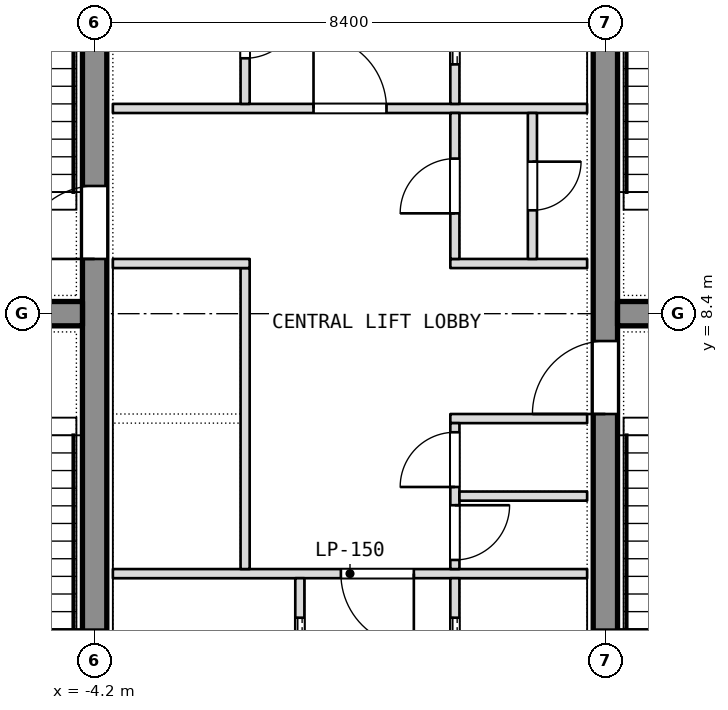
"""IFC4 building model, lengths in metres.
Left out: names, types, materials, properties, quantities, classifications, styles, units other than length and angle.
Written with IfcOpenShell. Run it as: python <this file> out.ifc"""

import sys

from ifc_helpers import new_model, si_unit, direction, frame, frame_2d, origin, place, context, subcontext, project, spatial, rectangle, extrude, element, fill, save


model = new_model("IFC4")
c1 = context("Model", 3, precision=1e-05, world=origin(), true_north=direction((0.0, 1.0)))
c2 = subcontext(c1, "Body", "Model", "MODEL_VIEW")
j1 = project(units=[si_unit("LENGTHUNIT", "METRE"), si_unit("PLANEANGLEUNIT", "RADIAN")], contexts=[c1])
p1 = place(None, origin())
s1 = spatial("IfcSite", under=j1, at=p1, CompositionType="ELEMENT")
p2 = place(p1, origin())
s2 = spatial("IfcBuilding", under=s1, at=p2, CompositionType="ELEMENT")
p3 = place(p2, frame((0.0, 0.0, 245.3)))
s3 = spatial("IfcBuildingStorey", under=s2, at=p3, CompositionType="ELEMENT", Elevation=245.3)
p4 = place(p3, frame((-4.2, 0.8, 0.0), z_axis=(0.0, 0.0, 1.0), x_axis=(0.0, 1.0, 0.0)))
e1 = element("IfcWall", 1, at=p4, inside=s3, PredefinedType="SHEAR", context=c2, shape_type="SweptSolid", body=[
    extrude(rectangle(XDim=15.2, YDim=0.4, at=frame_2d((7.6, 0.0))), origin(), (0.0, 0.0, 1.0), 3.6),
])
p5 = place(p4, frame((8.5, 0.0, 0.0)))
e2 = element("IfcOpeningElement", 2, at=p5, cuts=e1, PredefinedType="OPENING", context=c2, shape_type="SweptSolid", body=[
    extrude(rectangle(XDim=1.2, YDim=2.1, at=frame_2d((0.6, 1.05))), frame((0.0, 0.2, 0.0), z_axis=(0.0, -1.0, 0.0), x_axis=(1.0, 0.0, 0.0)), (0.0, 0.0, 1.0), 0.4),
])
p6 = place(p3, frame((4.2, 0.8, 0.0), z_axis=(0.0, 0.0, 1.0), x_axis=(0.0, 1.0, 0.0)))
e3 = element("IfcWall", 3, at=p6, inside=s3, PredefinedType="SHEAR", context=c2, shape_type="SweptSolid", body=[
    extrude(rectangle(XDim=15.2, YDim=0.4, at=frame_2d((7.6, 0.0))), origin(), (0.0, 0.0, 1.0), 3.6),
])
p7 = place(p6, frame((5.95, 0.0, 0.0)))
e4 = element("IfcOpeningElement", 4, at=p7, cuts=e3, PredefinedType="OPENING", context=c2, shape_type="SweptSolid", body=[
    extrude(rectangle(XDim=1.2, YDim=2.1, at=frame_2d((0.6, 1.05))), frame((0.0, 0.2, 0.0), z_axis=(0.0, -1.0, 0.0), x_axis=(1.0, 0.0, 0.0)), (0.0, 0.0, 1.0), 0.4),
])
for number, where, z_axis, x_axis in (
    (5, (-11.1, 8.4, 0.0), (0.0, 0.0, 1.0), (1.0, 0.0, 0.0)),
    (6, (4.4, 8.4, 0.0), (0.0, 0.0, 1.0), (1.0, 0.0, 0.0)),
):
    element("IfcWall", number, at=place(p3, frame(where, z_axis=z_axis, x_axis=x_axis)), inside=s3, PredefinedType="SHEAR", context=c2, shape_type="SweptSolid", body=[
        extrude(rectangle(XDim=6.7, YDim=0.4, at=frame_2d((3.35, 0.0))), origin(), (0.0, 0.0, 1.0), 3.6),
    ])
p8 = place(p3, frame((-3.9, 4.125, 0.0), z_axis=(0.0, 0.0, 1.0), x_axis=(1.0, 0.0, 0.0)))
e7 = element("IfcWall", 7, at=p8, inside=s3, PredefinedType="PARTITIONING", context=c2, shape_type="SweptSolid", body=[
    extrude(rectangle(XDim=7.8, YDim=0.15, at=frame_2d((3.9, 0.0))), origin(), (0.0, 0.0, 1.0), 3.34),
])
p9 = place(p8, frame((3.75, 0.0, 0.0)))
e8 = element("IfcOpeningElement", 8, at=p9, cuts=e7, PredefinedType="OPENING", context=c2, shape_type="SweptSolid", body=[
    extrude(rectangle(XDim=1.2, YDim=2.1, at=frame_2d((0.6, 1.05))), frame((0.0, 0.075, 0.0), z_axis=(0.0, -1.0, 0.0), x_axis=(1.0, 0.0, 0.0)), (0.0, 0.0, 1.0), 0.15),
])
p10 = place(p3, frame((-3.9, 11.775, 0.0), z_axis=(0.0, 0.0, 1.0), x_axis=(1.0, 0.0, 0.0)))
e9 = element("IfcWall", 9, at=p10, inside=s3, PredefinedType="PARTITIONING", context=c2, shape_type="SweptSolid", body=[
    extrude(rectangle(XDim=7.8, YDim=0.15, at=frame_2d((3.9, 0.0))), origin(), (0.0, 0.0, 1.0), 3.34),
])
p11 = place(p10, frame((3.3, 0.0, 0.0)))
e10 = element("IfcOpeningElement", 10, at=p11, cuts=e9, PredefinedType="OPENING", context=c2, shape_type="SweptSolid", body=[
    extrude(rectangle(XDim=1.2, YDim=2.1, at=frame_2d((0.6, 1.05))), frame((0.0, 0.075, 0.0), z_axis=(0.0, -1.0, 0.0), x_axis=(1.0, 0.0, 0.0)), (0.0, 0.0, 1.0), 0.15),
])
p12 = place(p3, frame((-0.825, 1.5, 0.0), z_axis=(0.0, 0.0, 1.0), x_axis=(0.0, 1.0, 0.0)))
e11 = element("IfcWall", 11, at=p12, inside=s3, PredefinedType="SHEAR", context=c2, shape_type="SweptSolid", body=[
    extrude(rectangle(XDim=2.55, YDim=0.15, at=frame_2d((1.275, 0.0))), origin(), (0.0, 0.0, 1.0), 3.6),
])
p13 = place(p12, frame((0.8, 0.0, 0.0)))
e12 = element("IfcOpeningElement", 12, at=p13, cuts=e11, PredefinedType="OPENING", context=c2, shape_type="SweptSolid", body=[
    extrude(rectangle(XDim=1.1, YDim=2.1, at=frame_2d((0.55, 1.05))), frame((0.0, 0.075, 0.0), z_axis=(0.0, -1.0, 0.0), x_axis=(1.0, 0.0, 0.0)), (0.0, 0.0, 1.0), 0.15),
])
p14 = place(p3, frame((-1.725, 4.2, 0.0), z_axis=(0.0, 0.0, 1.0), x_axis=(0.0, 1.0, 0.0)))
e13 = element("IfcWall", 13, at=p14, inside=s3, PredefinedType="SHEAR", context=c2, shape_type="SweptSolid", body=[
    extrude(rectangle(XDim=4.95, YDim=0.15, at=frame_2d((2.475, 0.0))), origin(), (0.0, 0.0, 1.0), 3.6),
])
p15 = place(p3, frame((-3.9, 9.225, 0.0), z_axis=(0.0, 0.0, 1.0), x_axis=(1.0, 0.0, 0.0)))
e14 = element("IfcWall", 14, at=p15, inside=s3, PredefinedType="SHEAR", context=c2, shape_type="SweptSolid", body=[
    extrude(rectangle(XDim=2.25, YDim=0.15, at=frame_2d((1.125, 0.0))), origin(), (0.0, 0.0, 1.0), 3.6),
])
p16 = place(p3, frame((-1.725, 11.85, 0.0), z_axis=(0.0, 0.0, 1.0), x_axis=(0.0, 1.0, 0.0)))
e15 = element("IfcWall", 15, at=p16, inside=s3, PredefinedType="PARTITIONING", context=c2, shape_type="SweptSolid", body=[
    extrude(rectangle(XDim=2.4, YDim=0.15, at=frame_2d((1.2, 0.0))), origin(), (0.0, 0.0, 1.0), 3.34),
])
p17 = place(p16, frame((0.75, 0.0, 0.0)))
e16 = element("IfcOpeningElement", 16, at=p17, cuts=e15, PredefinedType="OPENING", context=c2, shape_type="SweptSolid", body=[
    extrude(rectangle(XDim=0.9, YDim=2.1, at=frame_2d((0.45, 1.05))), frame((0.0, 0.075, 0.0), z_axis=(0.0, -1.0, 0.0), x_axis=(1.0, 0.0, 0.0)), (0.0, 0.0, 1.0), 0.15),
])
p18 = place(p3, frame((1.725, 1.65, 0.0), z_axis=(0.0, 0.0, 1.0), x_axis=(0.0, 1.0, 0.0)))
e17 = element("IfcWall", 17, at=p18, inside=s3, PredefinedType="SHEAR", context=c2, shape_type="SweptSolid", body=[
    extrude(rectangle(XDim=2.4, YDim=0.15, at=frame_2d((1.2, 0.0))), origin(), (0.0, 0.0, 1.0), 3.6),
])
p19 = place(p18, frame((0.65, 0.0, 0.0)))
e18 = element("IfcOpeningElement", 18, at=p19, cuts=e17, PredefinedType="OPENING", context=c2, shape_type="SweptSolid", body=[
    extrude(rectangle(XDim=1.1, YDim=2.1, at=frame_2d((0.55, 1.05))), frame((0.0, 0.075, 0.0), z_axis=(0.0, -1.0, 0.0), x_axis=(1.0, 0.0, 0.0)), (0.0, 0.0, 1.0), 0.15),
])
p20 = place(p3, frame((1.725, 11.85, 0.0), z_axis=(0.0, 0.0, 1.0), x_axis=(0.0, 1.0, 0.0)))
e19 = element("IfcWall", 19, at=p20, inside=s3, PredefinedType="SHEAR", context=c2, shape_type="SweptSolid", body=[
    extrude(rectangle(XDim=2.4, YDim=0.15, at=frame_2d((1.2, 0.0))), origin(), (0.0, 0.0, 1.0), 3.6),
])
p21 = place(p20, frame((0.65, 0.0, 0.0)))
e20 = element("IfcOpeningElement", 20, at=p21, cuts=e19, PredefinedType="OPENING", context=c2, shape_type="SweptSolid", body=[
    extrude(rectangle(XDim=1.1, YDim=2.1, at=frame_2d((0.55, 1.05))), frame((0.0, 0.075, 0.0), z_axis=(0.0, -1.0, 0.0), x_axis=(1.0, 0.0, 0.0)), (0.0, 0.0, 1.0), 0.15),
])
for number, where, z_axis, x_axis in (
    (21, (1.65, 6.675, 0.0), (0.0, 0.0, 1.0), (1.0, 0.0, 0.0)),
    (22, (1.65, 9.225, 0.0), (0.0, 0.0, 1.0), (1.0, 0.0, 0.0)),
):
    element("IfcWall", number, at=place(p3, frame(where, z_axis=z_axis, x_axis=x_axis)), inside=s3, PredefinedType="PARTITIONING", context=c2, shape_type="SweptSolid", body=[
        extrude(rectangle(XDim=2.25, YDim=0.15, at=frame_2d((1.125, 0.0))), origin(), (0.0, 0.0, 1.0), 3.34),
    ])
p22 = place(p3, frame((1.725, 4.2, 0.0), z_axis=(0.0, 0.0, 1.0), x_axis=(0.0, 1.0, 0.0)))
e23 = element("IfcWall", 23, at=p22, inside=s3, PredefinedType="PARTITIONING", context=c2, shape_type="SweptSolid", body=[
    extrude(rectangle(XDim=2.4, YDim=0.15, at=frame_2d((1.2, 0.0))), origin(), (0.0, 0.0, 1.0), 3.34),
])
p23 = place(p22, frame((0.15, 0.0, 0.0)))
e24 = element("IfcOpeningElement", 24, at=p23, cuts=e23, PredefinedType="OPENING", context=c2, shape_type="SweptSolid", body=[
    extrude(rectangle(XDim=0.9, YDim=2.1, at=frame_2d((0.45, 1.05))), frame((0.0, 0.075, 0.0), z_axis=(0.0, -1.0, 0.0), x_axis=(1.0, 0.0, 0.0)), (0.0, 0.0, 1.0), 0.15),
])
p24 = place(p22, frame((1.35, 0.0, 0.0)))
e25 = element("IfcOpeningElement", 25, at=p24, cuts=e23, PredefinedType="OPENING", context=c2, shape_type="SweptSolid", body=[
    extrude(rectangle(XDim=0.9, YDim=2.1, at=frame_2d((0.45, 1.05))), frame((0.0, 0.075, 0.0), z_axis=(0.0, -1.0, 0.0), x_axis=(1.0, 0.0, 0.0)), (0.0, 0.0, 1.0), 0.15),
])
p25 = place(p3, frame((1.725, 9.3, 0.0), z_axis=(0.0, 0.0, 1.0), x_axis=(0.0, 1.0, 0.0)))
e26 = element("IfcWall", 26, at=p25, inside=s3, PredefinedType="PARTITIONING", context=c2, shape_type="SweptSolid", body=[
    extrude(rectangle(XDim=2.4, YDim=0.15, at=frame_2d((1.2, 0.0))), origin(), (0.0, 0.0, 1.0), 3.34),
])
p26 = place(p25, frame((0.75, 0.0, 0.0)))
e27 = element("IfcOpeningElement", 27, at=p26, cuts=e26, PredefinedType="OPENING", context=c2, shape_type="SweptSolid", body=[
    extrude(rectangle(XDim=0.9, YDim=2.1, at=frame_2d((0.45, 1.05))), frame((0.0, 0.075, 0.0), z_axis=(0.0, -1.0, 0.0), x_axis=(1.0, 0.0, 0.0)), (0.0, 0.0, 1.0), 0.15),
])
p27 = place(p3, frame((1.8, 5.4, 0.0), z_axis=(0.0, 0.0, 1.0), x_axis=(1.0, 0.0, 0.0)))
e28 = element("IfcWall", 28, at=p27, inside=s3, PredefinedType="PARTITIONING", context=c2, shape_type="SweptSolid", body=[
    extrude(rectangle(XDim=2.1, YDim=0.15, at=frame_2d((1.05, 0.0))), origin(), (0.0, 0.0, 1.0), 3.34),
])
p28 = place(p3, frame((3.0, 9.3, 0.0), z_axis=(0.0, 0.0, 1.0), x_axis=(0.0, 1.0, 0.0)))
e29 = element("IfcWall", 29, at=p28, inside=s3, PredefinedType="PARTITIONING", context=c2, shape_type="SweptSolid", body=[
    extrude(rectangle(XDim=2.4, YDim=0.15, at=frame_2d((1.2, 0.0))), origin(), (0.0, 0.0, 1.0), 3.34),
])
p29 = place(p28, frame((0.8, 0.0, 0.0)))
e30 = element("IfcOpeningElement", 30, at=p29, cuts=e29, PredefinedType="OPENING", context=c2, shape_type="SweptSolid", body=[
    extrude(rectangle(XDim=0.8, YDim=2.1, at=frame_2d((0.4, 1.05))), frame((0.0, 0.075, 0.0), z_axis=(0.0, -1.0, 0.0), x_axis=(1.0, 0.0, 0.0)), (0.0, 0.0, 1.0), 0.15),
])
p30 = place(p23, origin())
e31 = element("IfcDoor", 31, at=p30, inside=s3, OperationType="SINGLE_SWING_LEFT", PredefinedType="DOOR", context=c2, shape_type="SweptSolid", body=[
    extrude(rectangle(XDim=0.9, YDim=2.1, at=frame_2d((0.45, 1.05))), frame((0.0, 0.025, 0.0), z_axis=(0.0, -1.0, 0.0), x_axis=(1.0, 0.0, 0.0)), (0.0, 0.0, 1.0), 0.05),
])
fill(e24, e31)
p31 = place(p24, origin())
e32 = element("IfcDoor", 32, at=p31, inside=s3, OperationType="SINGLE_SWING_LEFT", PredefinedType="DOOR", context=c2, shape_type="SweptSolid", body=[
    extrude(rectangle(XDim=0.9, YDim=2.1, at=frame_2d((0.45, 1.05))), frame((0.0, 0.025, 0.0), z_axis=(0.0, -1.0, 0.0), x_axis=(1.0, 0.0, 0.0)), (0.0, 0.0, 1.0), 0.05),
])
fill(e25, e32)
p32 = place(p26, origin())
e33 = element("IfcDoor", 33, at=p32, inside=s3, OperationType="SINGLE_SWING_LEFT", PredefinedType="DOOR", context=c2, shape_type="SweptSolid", body=[
    extrude(rectangle(XDim=0.9, YDim=2.1, at=frame_2d((0.45, 1.05))), frame((0.0, 0.025, 0.0), z_axis=(0.0, -1.0, 0.0), x_axis=(1.0, 0.0, 0.0)), (0.0, 0.0, 1.0), 0.05),
])
fill(e27, e33)
p33 = place(p29, origin())
e34 = element("IfcDoor", 34, at=p33, inside=s3, OperationType="SINGLE_SWING_LEFT", PredefinedType="DOOR", context=c2, shape_type="SweptSolid", body=[
    extrude(rectangle(XDim=0.8, YDim=2.1, at=frame_2d((0.4, 1.05))), frame((0.0, 0.025, 0.0), z_axis=(0.0, -1.0, 0.0), x_axis=(1.0, 0.0, 0.0)), (0.0, 0.0, 1.0), 0.05),
])
fill(e30, e34)
p34 = place(p13, origin())
e35 = element("IfcDoor", 35, at=p34, inside=s3, OperationType="SLIDING_TO_LEFT", PredefinedType="DOOR", context=c2, shape_type="SweptSolid", body=[
    extrude(rectangle(XDim=1.1, YDim=2.1, at=frame_2d((0.55, 1.05))), frame((0.0, 0.025, 0.0), z_axis=(0.0, -1.0, 0.0), x_axis=(1.0, 0.0, 0.0)), (0.0, 0.0, 1.0), 0.05),
])
fill(e12, e35)
p35 = place(p19, origin())
e36 = element("IfcDoor", 36, at=p35, inside=s3, OperationType="SLIDING_TO_LEFT", PredefinedType="DOOR", context=c2, shape_type="SweptSolid", body=[
    extrude(rectangle(XDim=1.1, YDim=2.1, at=frame_2d((0.55, 1.05))), frame((0.0, 0.025, 0.0), z_axis=(0.0, -1.0, 0.0), x_axis=(1.0, 0.0, 0.0)), (0.0, 0.0, 1.0), 0.05),
])
fill(e18, e36)
p36 = place(p21, origin())
e37 = element("IfcDoor", 37, at=p36, inside=s3, OperationType="SLIDING_TO_LEFT", PredefinedType="DOOR", context=c2, shape_type="SweptSolid", body=[
    extrude(rectangle(XDim=1.1, YDim=2.1, at=frame_2d((0.55, 1.05))), frame((0.0, 0.025, 0.0), z_axis=(0.0, -1.0, 0.0), x_axis=(1.0, 0.0, 0.0)), (0.0, 0.0, 1.0), 0.05),
])
fill(e20, e37)
p37 = place(p9, origin())
e38 = element("IfcDoor", 38, at=p37, inside=s3, OperationType="SINGLE_SWING_LEFT", PredefinedType="DOOR", context=c2, shape_type="SweptSolid", body=[
    extrude(rectangle(XDim=1.2, YDim=2.1, at=frame_2d((0.6, 1.05))), frame((0.0, 0.025, 0.0), z_axis=(0.0, -1.0, 0.0), x_axis=(1.0, 0.0, 0.0)), (0.0, 0.0, 1.0), 0.05),
])
fill(e8, e38)
p38 = place(p11, origin())
e39 = element("IfcDoor", 39, at=p38, inside=s3, OperationType="SINGLE_SWING_LEFT", PredefinedType="DOOR", context=c2, shape_type="SweptSolid", body=[
    extrude(rectangle(XDim=1.2, YDim=2.1, at=frame_2d((0.6, 1.05))), frame((0.0, 0.025, 0.0), z_axis=(0.0, -1.0, 0.0), x_axis=(1.0, 0.0, 0.0)), (0.0, 0.0, 1.0), 0.05),
])
fill(e10, e39)
p39 = place(p17, origin())
e40 = element("IfcDoor", 40, at=p39, inside=s3, OperationType="SINGLE_SWING_LEFT", PredefinedType="DOOR", context=c2, shape_type="SweptSolid", body=[
    extrude(rectangle(XDim=0.9, YDim=2.1, at=frame_2d((0.45, 1.05))), frame((0.0, 0.025, 0.0), z_axis=(0.0, -1.0, 0.0), x_axis=(1.0, 0.0, 0.0)), (0.0, 0.0, 1.0), 0.05),
])
fill(e16, e40)
p40 = place(p5, origin())
e41 = element("IfcDoor", 41, at=p40, inside=s3, OperationType="SINGLE_SWING_LEFT", PredefinedType="DOOR", context=c2, shape_type="SweptSolid", body=[
    extrude(rectangle(XDim=1.2, YDim=2.1, at=frame_2d((0.6, 1.05))), frame((0.0, 0.025, 0.0), z_axis=(0.0, -1.0, 0.0), x_axis=(1.0, 0.0, 0.0)), (0.0, 0.0, 1.0), 0.05),
])
fill(e2, e41)
p41 = place(p7, origin())
e42 = element("IfcDoor", 42, at=p41, inside=s3, OperationType="SINGLE_SWING_LEFT", PredefinedType="DOOR", context=c2, shape_type="SweptSolid", body=[
    extrude(rectangle(XDim=1.2, YDim=2.1, at=frame_2d((0.6, 1.05))), frame((0.0, 0.025, 0.0), z_axis=(0.0, -1.0, 0.0), x_axis=(1.0, 0.0, 0.0)), (0.0, 0.0, 1.0), 0.05),
])
fill(e4, e42)
save(model, sys.argv[1])
